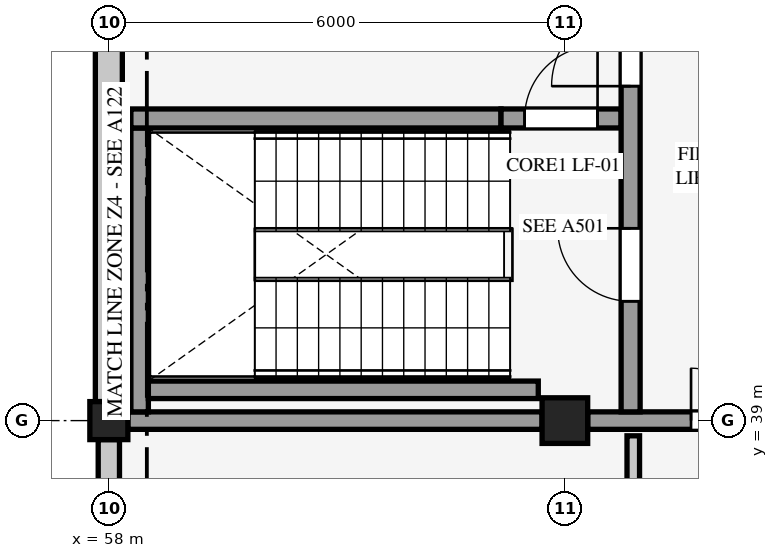
"""IFC4 building model, lengths in metres.
Left out: names, types, materials, properties, quantities, classifications, styles, units other than length and angle.
Written with IfcOpenShell. Run it as: python <this file> out.ifc"""

import sys

from ifc_helpers import new_model, si_unit, direction, frame, frame_2d, origin, origin_2d, place, context, subcontext, project, spatial, rectangle, extrude, element, fill, save


model = new_model("IFC4")
c1 = context("Model", 3, precision=1e-05, world=origin(), true_north=direction((0.0, 1.0)))
c2 = subcontext(c1, "Body", "Model", "MODEL_VIEW")
j1 = project(units=[si_unit("LENGTHUNIT", "METRE"), si_unit("PLANEANGLEUNIT", "RADIAN")], contexts=[c1])
p1 = place(None, origin())
s1 = spatial("IfcSite", under=j1, at=p1, CompositionType="ELEMENT")
p2 = place(p1, origin())
s2 = spatial("IfcBuilding", under=s1, at=p2, CompositionType="ELEMENT")
p3 = place(p2, frame((0.0, 0.0, 9.0)))
s3 = spatial("IfcBuildingStorey", under=s2, at=p3, CompositionType="ELEMENT", Elevation=9.0)
p4 = place(p3, frame((58.0, 39.0, 0.0), z_axis=(0.0, 0.0, 1.0), x_axis=(1.0, 0.0, 0.0)))
e1 = element("IfcColumn", 1, at=p4, inside=s3, PredefinedType="COLUMN", context=c2, shape_type="SweptSolid", body=[
    extrude(rectangle(XDim=0.5, YDim=0.5, at=origin_2d()), origin(), (0.0, 0.0, 1.0), 4.5),
])
p5 = place(p3, frame((64.0, 39.0, 0.0), z_axis=(0.0, 0.0, 1.0), x_axis=(1.0, 0.0, 0.0)))
e2 = element("IfcColumn", 2, at=p5, inside=s3, PredefinedType="COLUMN", context=c2, shape_type="SweptSolid", body=[
    extrude(rectangle(XDim=0.6, YDim=0.6, at=origin_2d()), origin(), (0.0, 0.0, 1.0), 4.5),
])
p6 = place(p3, frame((58.0, 33.325, 0.0), z_axis=(0.0, 0.0, 1.0), x_axis=(0.0, 1.0, 0.0)))
e3 = element("IfcWall", 3, at=p6, inside=s3, PredefinedType="SOLIDWALL", context=c2, shape_type="SweptSolid", body=[
    extrude(rectangle(XDim=5.425, YDim=0.28, at=frame_2d((2.712, 0.0))), origin(), (0.0, 0.0, 1.0), 3.809),
])
p7 = place(p6, frame((1.913, 0.0, 1.25)))
e4 = element("IfcOpeningElement", 4, at=p7, cuts=e3, PredefinedType="OPENING", context=c2, shape_type="SweptSolid", body=[
    extrude(rectangle(XDim=1.6, YDim=1.5, at=frame_2d((0.8, 0.75))), frame((0.0, 0.15, 0.0), z_axis=(0.0, -1.0, 0.0), x_axis=(1.0, 0.0, 0.0)), (0.0, 0.0, 1.0), 0.3),
])
p8 = place(p3, frame((58.0, 39.25, 0.0), z_axis=(0.0, 0.0, 1.0), x_axis=(0.0, 1.0, 0.0)))
e5 = element("IfcWall", 5, at=p8, inside=s3, PredefinedType="SOLIDWALL", context=c2, shape_type="SweptSolid", body=[
    extrude(rectangle(XDim=5.425, YDim=0.355, at=frame_2d((2.712, 0.0))), origin(), (0.0, 0.0, 1.0), 3.809),
])
p9 = place(p3, frame((58.25, 39.0, 0.0), z_axis=(0.0, 0.0, 1.0), x_axis=(1.0, 0.0, 0.0)))
e6 = element("IfcWall", 6, at=p9, inside=s3, PredefinedType="SHEAR", context=c2, shape_type="SweptSolid", body=[
    extrude(rectangle(XDim=5.45, YDim=0.23, at=frame_2d((2.725, 0.0))), origin(), (0.0, 0.0, 1.0), 4.216),
])
p10 = place(p3, frame((64.3, 39.0, 0.0), z_axis=(0.0, 0.0, 1.0), x_axis=(1.0, 0.0, 0.0)))
e7 = element("IfcWall", 7, at=p10, inside=s3, PredefinedType="SHEAR", context=c2, shape_type="SweptSolid", body=[
    extrude(rectangle(XDim=5.4, YDim=0.23, at=frame_2d((2.7, 0.0))), origin(), (0.0, 0.0, 1.0), 4.216),
])
p11 = place(p10, frame((1.36, 0.0, 0.0)))
e8 = element("IfcOpeningElement", 8, at=p11, cuts=e7, PredefinedType="OPENING", context=c2, shape_type="SweptSolid", body=[
    extrude(rectangle(XDim=1.38, YDim=2.16, at=frame_2d((0.69, 1.08))), frame((0.0, 0.125, 0.0), z_axis=(0.0, -1.0, 0.0), x_axis=(1.0, 0.0, 0.0)), (0.0, 0.0, 1.0), 0.25),
])
p12 = place(p3, frame((58.405, 39.115, 0.0), z_axis=(0.0, 0.0, 1.0), x_axis=(0.0, 1.0, 0.0)))
e9 = element("IfcWall", 9, at=p12, inside=s3, PredefinedType="SHEAR", context=c2, shape_type="SweptSolid", body=[
    extrude(rectangle(XDim=3.735, YDim=0.23, at=frame_2d((1.868, 0.0))), origin(), (0.0, 0.0, 1.0), 4.5),
])
p13 = place(p3, frame((58.52, 39.405, 0.0), z_axis=(0.0, 0.0, 1.0), x_axis=(1.0, 0.0, 0.0)))
e10 = element("IfcWall", 10, at=p13, inside=s3, PredefinedType="SHEAR", context=c2, shape_type="SweptSolid", body=[
    extrude(rectangle(XDim=5.13, YDim=0.23, at=frame_2d((2.565, 0.0))), origin(), (0.0, 0.0, 1.0), 4.5),
])
p14 = place(p3, frame((58.29, 42.975, 0.0), z_axis=(0.0, 0.0, 1.0), x_axis=(1.0, 0.0, 0.0)))
e11 = element("IfcWall", 11, at=p14, inside=s3, PredefinedType="SHEAR", context=c2, shape_type="SweptSolid", body=[
    extrude(rectangle(XDim=4.87, YDim=0.25, at=frame_2d((2.435, 0.0))), origin(), (0.0, 0.0, 1.0), 4.5),
])
p15 = place(p3, frame((63.16, 42.975, 0.0), z_axis=(0.0, 0.0, 1.0), x_axis=(1.0, 0.0, 0.0)))
e12 = element("IfcWall", 12, at=p15, inside=s3, PredefinedType="SHEAR", context=c2, shape_type="SweptSolid", body=[
    extrude(rectangle(XDim=1.58, YDim=0.25, at=frame_2d((0.79, 0.0))), origin(), (0.0, 0.0, 1.0), 4.216),
])
p16 = place(p15, frame((0.31, 0.0, 0.0)))
e13 = element("IfcOpeningElement", 13, at=p16, cuts=e12, PredefinedType="OPENING", context=c2, shape_type="SweptSolid", body=[
    extrude(rectangle(XDim=0.96, YDim=2.12, at=frame_2d((0.48, 1.06))), frame((0.0, 0.135, 0.0), z_axis=(0.0, -1.0, 0.0), x_axis=(1.0, 0.0, 0.0)), (0.0, 0.0, 1.0), 0.27),
])
p17 = place(p3, frame((64.865, 39.115, 0.0), z_axis=(0.0, 0.0, 1.0), x_axis=(0.0, 1.0, 0.0)))
e14 = element("IfcWall", 14, at=p17, inside=s3, PredefinedType="SHEAR", context=c2, shape_type="SweptSolid", body=[
    extrude(rectangle(XDim=5.77, YDim=0.25, at=frame_2d((2.885, 0.0))), origin(), (0.0, 0.0, 1.0), 4.216),
])
p18 = place(p17, frame((4.285, 0.0, 0.0)))
e15 = element("IfcOpeningElement", 15, at=p18, cuts=e14, PredefinedType="OPENING", context=c2, shape_type="SweptSolid", body=[
    extrude(rectangle(XDim=1.04, YDim=2.14, at=frame_2d((0.52, 1.07))), frame((0.0, 0.135, 0.0), z_axis=(0.0, -1.0, 0.0), x_axis=(1.0, 0.0, 0.0)), (0.0, 0.0, 1.0), 0.27),
])
p19 = place(p17, frame((1.455, 0.0, 0.0)))
e16 = element("IfcOpeningElement", 16, at=p19, cuts=e14, PredefinedType="OPENING", context=c2, shape_type="SweptSolid", body=[
    extrude(rectangle(XDim=0.96, YDim=2.12, at=frame_2d((0.48, 1.06))), frame((0.0, 0.135, 0.0), z_axis=(0.0, -1.0, 0.0), x_axis=(1.0, 0.0, 0.0)), (0.0, 0.0, 1.0), 0.27),
])
p20 = place(p3, frame((64.9, 35.5, 0.0), z_axis=(0.0, 0.0, 1.0), x_axis=(0.0, 1.0, 0.0)))
e17 = element("IfcWall", 17, at=p20, inside=s3, PredefinedType="PARTITIONING", context=c2, shape_type="SweptSolid", body=[
    extrude(rectangle(XDim=3.3, YDim=0.165, at=frame_2d((1.65, 0.0))), origin(), (0.0, 0.0, 1.0), 4.24),
])
p21 = place(p20, frame((1.18, 0.0, 0.0)))
e18 = element("IfcOpeningElement", 18, at=p21, cuts=e17, PredefinedType="OPENING", context=c2, shape_type="SweptSolid", body=[
    extrude(rectangle(XDim=0.94, YDim=2.1, at=frame_2d((0.47, 1.05))), frame((0.0, 0.093, 0.0), z_axis=(0.0, -1.0, 0.0), x_axis=(1.0, 0.0, 0.0)), (0.0, 0.0, 1.0), 0.185),
])
p22 = place(p11, origin())
e19 = element("IfcDoor", 19, at=p22, inside=s3, OperationType="DOUBLE_DOOR_SINGLE_SWING", PredefinedType="DOOR", context=c2, shape_type="SweptSolid", body=[
    extrude(rectangle(XDim=1.38, YDim=2.16, at=frame_2d((0.69, 1.08))), frame((0.0, 0.025, 0.0), z_axis=(0.0, -1.0, 0.0), x_axis=(1.0, 0.0, 0.0)), (0.0, 0.0, 1.0), 0.05),
])
fill(e8, e19)
p23 = place(p16, origin())
e20 = element("IfcDoor", 20, at=p23, inside=s3, OperationType="SINGLE_SWING_RIGHT", PredefinedType="DOOR", context=c2, shape_type="SweptSolid", body=[
    extrude(rectangle(XDim=0.96, YDim=2.12, at=frame_2d((0.48, 1.06))), frame((0.0, 0.025, 0.0), z_axis=(0.0, -1.0, 0.0), x_axis=(1.0, 0.0, 0.0)), (0.0, 0.0, 1.0), 0.05),
])
fill(e13, e20)
p24 = place(p18, origin())
e21 = element("IfcDoor", 21, at=p24, inside=s3, OperationType="SINGLE_SWING_LEFT", PredefinedType="DOOR", context=c2, shape_type="SweptSolid", body=[
    extrude(rectangle(XDim=1.04, YDim=2.14, at=frame_2d((0.52, 1.07))), frame((0.0, 0.025, 0.0), z_axis=(0.0, -1.0, 0.0), x_axis=(1.0, 0.0, 0.0)), (0.0, 0.0, 1.0), 0.05),
])
fill(e15, e21)
p25 = place(p19, origin())
e22 = element("IfcDoor", 22, at=p25, inside=s3, OperationType="SINGLE_SWING_RIGHT", PredefinedType="DOOR", context=c2, shape_type="SweptSolid", body=[
    extrude(rectangle(XDim=0.96, YDim=2.12, at=frame_2d((0.48, 1.06))), frame((0.0, 0.025, 0.0), z_axis=(0.0, -1.0, 0.0), x_axis=(1.0, 0.0, 0.0)), (0.0, 0.0, 1.0), 0.05),
])
fill(e16, e22)
save(model, sys.argv[1])
